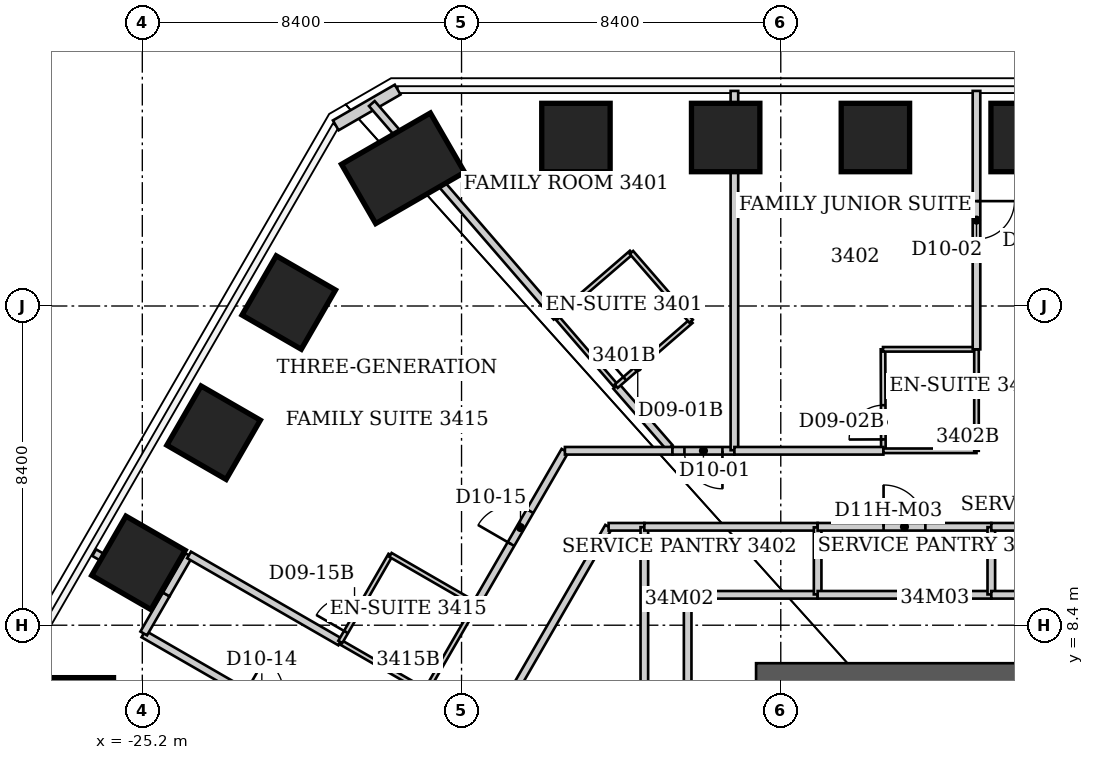
"""IFC4 building model, lengths in metres.
Left out: names, types, materials, properties, quantities, classifications, styles, units other than length and angle.
Written with IfcOpenShell. Run it as: python <this file> out.ifc"""

import sys

from ifc_helpers import new_model, si_unit, direction, frame, frame_2d, origin, origin_2d, place, context, subcontext, project, spatial, rectangle, extrude, element, fill, save


model = new_model("IFC4")
c1 = context("Model", 3, precision=1e-05, world=origin(), true_north=direction((0.0, 1.0)))
c2 = subcontext(c1, "Body", "Model", "MODEL_VIEW")
j1 = project(units=[si_unit("LENGTHUNIT", "METRE"), si_unit("PLANEANGLEUNIT", "RADIAN")], contexts=[c1])
p1 = place(None, origin())
s1 = spatial("IfcSite", under=j1, at=p1, CompositionType="ELEMENT")
p2 = place(p1, origin())
s2 = spatial("IfcBuilding", under=s1, at=p2, CompositionType="ELEMENT")
p3 = place(p2, frame((0.0, 0.0, 138.6)))
s3 = spatial("IfcBuildingStorey", under=s2, at=p3, CompositionType="ELEMENT", Elevation=138.6)
for number, where, z_axis, x_axis in (
    (1, (-13.79, 21.234, 0.0), (0.0, 0.0, 1.0), (0.0, 1.0, 0.0)),
    (2, (-9.85, 21.234, 0.0), (0.0, 0.0, 1.0), (0.0, 1.0, 0.0)),
    (3, (-5.91, 21.234, 0.0), (0.0, 0.0, 1.0), (0.0, 1.0, 0.0)),
    (4, (-1.97, 21.234, 0.0), (0.0, 0.0, 1.0), (0.0, 1.0, 0.0)),
):
    element("IfcColumn", number, at=place(p3, frame(where, z_axis=z_axis, x_axis=x_axis)), inside=s3, PredefinedType="COLUMN", context=c2, shape_type="SweptSolid", body=[
        extrude(rectangle(XDim=1.8, YDim=1.8, at=origin_2d()), origin(), (0.0, 0.0, 1.0), 3.8),
    ])
p4 = place(p3, frame((-26.857, 5.67, 0.0), z_axis=(0.0, 0.0, 1.0), x_axis=(-1.0, 0.0, 0.0)))
e5 = element("IfcColumn", 5, at=p4, inside=s3, PredefinedType="COLUMN", context=c2, shape_type="SweptSolid", body=[
    extrude(rectangle(XDim=1.8, YDim=2.7, at=origin_2d()), origin(), (0.0, 0.0, 1.0), 3.8),
])
for number, where, z_axis, x_axis in (
    (6, (-25.302, 10.041, 0.0), (0.0, 0.0, 1.0), (-0.866, 0.5, 0.0)),
    (7, (-23.324, 13.466, 0.0), (0.0, 0.0, 1.0), (-0.866, 0.5, 0.0)),
    (8, (-21.346, 16.891, 0.0), (0.0, 0.0, 1.0), (-0.866, 0.5, 0.0)),
):
    element("IfcColumn", number, at=place(p3, frame(where, z_axis=z_axis, x_axis=x_axis)), inside=s3, PredefinedType="COLUMN", context=c2, shape_type="SweptSolid", body=[
        extrude(rectangle(XDim=1.8, YDim=1.8, at=origin_2d()), origin(), (0.0, 0.0, 1.0), 3.8),
    ])
p5 = place(p3, frame((-18.339, 20.424, 0.0), z_axis=(0.0, 0.0, 1.0), x_axis=(-0.5, 0.866025403784, 0.0)))
e9 = element("IfcColumn", 9, at=p5, inside=s3, PredefinedType="COLUMN", context=c2, shape_type="SweptSolid", body=[
    extrude(rectangle(XDim=1.8, YDim=2.7, at=origin_2d()), origin(), (0.0, 0.0, 1.0), 3.8),
])
p6 = place(p3, frame((-9.05, 6.75, 0.0), z_axis=(0.0, 0.0, 1.0), x_axis=(1.0, 0.0, 0.0)))
e10 = element("IfcWall", 10, at=p6, inside=s3, PredefinedType="SHEAR", context=c2, shape_type="SweptSolid", body=[
    extrude(rectangle(XDim=18.1, YDim=1.3, at=frame_2d((9.05, 0.0))), origin(), (0.0, 0.0, 1.0), 3.8),
])
p7 = place(p3, frame((-20.11, 21.554, 0.0), z_axis=(0.0, 0.0, 1.0), x_axis=(0.865988793993, 0.500063404658, 0.0)))
e11 = element("IfcWall", 11, at=p7, inside=s3, PredefinedType="SOLIDWALL", context=c2, shape_type="SweptSolid", body=[
    extrude(rectangle(XDim=1.88, YDim=0.3, at=frame_2d((0.94, 0.0))), origin(), (0.0, 0.0, 1.0), 3.64),
])
p8 = place(p3, frame((-26.466, 10.31, 0.0), z_axis=(0.0, 0.0, 1.0), x_axis=(0.865037029405, -0.501708020425, 0.0)))
e12 = element("IfcWall", 12, at=p8, inside=s3, PredefinedType="PARTITIONING", context=c2, shape_type="SweptSolid", body=[
    extrude(rectangle(XDim=2.177, YDim=0.2, at=frame_2d((1.089, 0.0))), origin(), (0.0, 0.0, 1.0), 3.64),
])
p9 = place(p3, frame((-25.17, 8.17, 0.0), z_axis=(0.0, 0.0, 1.0), x_axis=(0.866448885678, -0.499265789443, 0.0)))
e13 = element("IfcWall", 13, at=p9, inside=s3, PredefinedType="PARTITIONING", context=c2, shape_type="SweptSolid", body=[
    extrude(rectangle(XDim=7.19, YDim=0.2, at=frame_2d((3.595, 0.0))), origin(), (0.0, 0.0, 1.0), 3.64),
])
p10 = place(p9, frame((3.095, 0.0, 0.0)))
e14 = element("IfcOpeningElement", 14, at=p10, cuts=e13, PredefinedType="OPENING", context=c2, shape_type="SweptSolid", body=[
    extrude(rectangle(XDim=1.0, YDim=2.13, at=frame_2d((0.5, 1.065))), frame((0.0, 0.1, 0.0), z_axis=(0.0, -1.0, 0.0), x_axis=(1.0, 0.0, 0.0)), (0.0, 0.0, 1.0), 0.2),
])
p11 = place(p3, frame((-25.163, 8.183, 0.0), z_axis=(0.0, 0.0, 1.0), x_axis=(0.499793761865, 0.866144442689, 0.0)))
e15 = element("IfcWall", 15, at=p11, inside=s3, PredefinedType="PARTITIONING", context=c2, shape_type="SweptSolid", body=[
    extrude(rectangle(XDim=1.186, YDim=0.2, at=frame_2d((0.593, 0.0))), origin(), (0.0, 0.0, 1.0), 3.64),
])
p12 = place(p3, frame((-24.57, 9.21, 0.0), z_axis=(0.0, 0.0, 1.0), x_axis=(0.499734288277, 0.866178758179, 0.0)))
e16 = element("IfcWall", 16, at=p12, inside=s3, PredefinedType="PARTITIONING", context=c2, shape_type="SweptSolid", body=[
    extrude(rectangle(XDim=1.191, YDim=0.2, at=frame_2d((0.595, 0.0))), origin(), (0.0, 0.0, 1.0), 3.64),
])
p13 = place(p3, frame((-23.97, 10.25, 0.0), z_axis=(0.0, 0.0, 1.0), x_axis=(0.86645101645, -0.499262091585, 0.0)))
e17 = element("IfcWall", 17, at=p13, inside=s3, PredefinedType="PARTITIONING", context=c2, shape_type="SweptSolid", body=[
    extrude(rectangle(XDim=4.592, YDim=0.2, at=frame_2d((2.296, 0.0))), origin(), (0.0, 0.0, 1.0), 3.64),
])
p14 = place(p3, frame((-19.991, 7.958, 0.0), z_axis=(0.0, 0.0, 1.0), x_axis=(0.866404475641, -0.499342852747, 0.0)))
e18 = element("IfcWall", 18, at=p14, inside=s3, PredefinedType="PARTITIONING", context=c2, shape_type="SweptSolid", body=[
    extrude(rectangle(XDim=2.599, YDim=0.12, at=frame_2d((1.299, 0.0))), origin(), (0.0, 0.0, 1.0), 3.64),
])
p15 = place(p3, frame((-19.16, 22.127, 0.0), z_axis=(0.0, 0.0, 1.0), x_axis=(0.654324699903, -0.756213717871, 0.0)))
e19 = element("IfcWall", 19, at=p15, inside=s3, PredefinedType="PARTITIONING", context=c2, shape_type="SweptSolid", body=[
    extrude(rectangle(XDim=7.428, YDim=0.2, at=frame_2d((3.714, 0.0))), origin(), (0.0, 0.0, 1.0), 3.64),
])
p16 = place(p3, frame((-18.67, 10.25, 0.0), z_axis=(0.0, 0.0, 1.0), x_axis=(-0.499407914056, -0.866366975004, 0.0)))
e20 = element("IfcWall", 20, at=p16, inside=s3, PredefinedType="PARTITIONING", context=c2, shape_type="SweptSolid", body=[
    extrude(rectangle(XDim=2.643, YDim=0.12, at=frame_2d((1.322, 0.0))), origin(), (0.0, 0.0, 1.0), 3.64),
])
p17 = place(p16, frame((1.443, 0.0, 0.0)))
e21 = element("IfcOpeningElement", 21, at=p17, cuts=e20, PredefinedType="OPENING", context=c2, shape_type="SweptSolid", body=[
    extrude(rectangle(XDim=0.9, YDim=2.03, at=frame_2d((0.45, 1.015))), frame((0.0, 0.06, 0.0), z_axis=(0.0, -1.0, 0.0), x_axis=(1.0, 0.0, 0.0)), (0.0, 0.0, 1.0), 0.12),
])
p18 = place(p3, frame((-17.74, 6.66, 0.0), z_axis=(0.0, 0.0, 1.0), x_axis=(0.500519174073, 0.865725450929, 0.0)))
e22 = element("IfcWall", 22, at=p18, inside=s3, PredefinedType="PARTITIONING", context=c2, shape_type="SweptSolid", body=[
    extrude(rectangle(XDim=2.643, YDim=0.12, at=frame_2d((1.322, 0.0))), origin(), (0.0, 0.0, 1.0), 3.64),
])
p19 = place(p3, frame((-16.56, 4.7, 0.0), z_axis=(0.0, 0.0, 1.0), x_axis=(0.4998524389, 0.866110581465, 0.0)))
e23 = element("IfcWall", 23, at=p19, inside=s3, PredefinedType="PARTITIONING", context=c2, shape_type="SweptSolid", body=[
    extrude(rectangle(XDim=7.262, YDim=0.2, at=frame_2d((3.631, 0.0))), origin(), (0.0, 0.0, 1.0), 3.64),
])
p20 = place(p3, frame((-16.42, 8.95, 0.0), z_axis=(0.0, 0.0, 1.0), x_axis=(-0.865856933682, 0.500291685314, 0.0)))
e24 = element("IfcWall", 24, at=p20, inside=s3, PredefinedType="PARTITIONING", context=c2, shape_type="SweptSolid", body=[
    extrude(rectangle(XDim=2.599, YDim=0.12, at=frame_2d((1.299, 0.0))), origin(), (0.0, 0.0, 1.0), 3.64),
])
p21 = place(p3, frame((-16.417, 8.948, 0.0), z_axis=(0.0, 0.0, 1.0), x_axis=(0.500547653499, 0.865708984923, 0.0)))
e25 = element("IfcWall", 25, at=p21, inside=s3, PredefinedType="PARTITIONING", context=c2, shape_type="SweptSolid", body=[
    extrude(rectangle(XDim=4.669, YDim=0.2, at=frame_2d((2.334, 0.0))), origin(), (0.0, 0.0, 1.0), 3.64),
])
p22 = place(p21, frame((1.834, 0.0, 0.0)))
e26 = element("IfcOpeningElement", 26, at=p22, cuts=e25, PredefinedType="OPENING", context=c2, shape_type="SweptSolid", body=[
    extrude(rectangle(XDim=1.0, YDim=2.13, at=frame_2d((0.5, 1.065))), frame((0.0, 0.1, 0.0), z_axis=(0.0, -1.0, 0.0), x_axis=(1.0, 0.0, 0.0)), (0.0, 0.0, 1.0), 0.2),
])
p23 = place(p3, frame((-14.3, 16.51, 0.0), z_axis=(0.0, 0.0, 1.0), x_axis=(0.653188728136, -0.757195143563, 0.0)))
e27 = element("IfcWall", 27, at=p23, inside=s3, PredefinedType="PARTITIONING", context=c2, shape_type="SweptSolid", body=[
    extrude(rectangle(XDim=2.404, YDim=0.12, at=frame_2d((1.202, 0.0))), origin(), (0.0, 0.0, 1.0), 3.64),
])
p24 = place(p3, frame((-12.93, 10.99, 0.0), z_axis=(0.0, 0.0, 1.0), x_axis=(1.0, 0.0, 0.0)))
e28 = element("IfcWall", 28, at=p24, inside=s3, PredefinedType="PARTITIONING", context=c2, shape_type="SweptSolid", body=[
    extrude(rectangle(XDim=0.94, YDim=0.2, at=frame_2d((0.47, 0.0))), origin(), (0.0, 0.0, 1.0), 3.64),
])
p25 = place(p3, frame((-12.73, 14.69, 0.0), z_axis=(0.0, 0.0, 1.0), x_axis=(0.656624063312, -0.754218031792, 0.0)))
e29 = element("IfcWall", 29, at=p25, inside=s3, PredefinedType="PARTITIONING", context=c2, shape_type="SweptSolid", body=[
    extrude(rectangle(XDim=2.144, YDim=0.2, at=frame_2d((1.072, 0.0))), origin(), (0.0, 0.0, 1.0), 3.64),
])
p26 = place(p3, frame((-12.73, 14.69, 0.0), z_axis=(0.0, 0.0, 1.0), x_axis=(0.755185511235, 0.655511131576, 0.0)))
e30 = element("IfcWall", 30, at=p26, inside=s3, PredefinedType="PARTITIONING", context=c2, shape_type="SweptSolid", body=[
    extrude(rectangle(XDim=2.609, YDim=0.12, at=frame_2d((1.304, 0.0))), origin(), (0.0, 0.0, 1.0), 3.64),
])
p27 = place(p26, frame((0.3, 0.0, 0.0)))
e31 = element("IfcOpeningElement", 31, at=p27, cuts=e30, PredefinedType="OPENING", context=c2, shape_type="SweptSolid", body=[
    extrude(rectangle(XDim=0.9, YDim=2.03, at=frame_2d((0.45, 1.015))), frame((0.0, 0.06, 0.0), z_axis=(0.0, -1.0, 0.0), x_axis=(1.0, 0.0, 0.0)), (0.0, 0.0, 1.0), 0.12),
])
p28 = place(p3, frame((-12.33, 18.21, 0.0), z_axis=(0.0, 0.0, 1.0), x_axis=(-0.757086659925, -0.653314464377, 0.0)))
e32 = element("IfcWall", 32, at=p28, inside=s3, PredefinedType="PARTITIONING", context=c2, shape_type="SweptSolid", body=[
    extrude(rectangle(XDim=2.602, YDim=0.12, at=frame_2d((1.301, 0.0))), origin(), (0.0, 0.0, 1.0), 3.64),
])
p29 = place(p3, frame((-11.99, 10.98, 0.0), z_axis=(0.0, 0.0, 1.0), x_axis=(0.0, -1.0, 0.0)))
e33 = element("IfcWall", 33, at=p29, inside=s3, PredefinedType="PARTITIONING", context=c2, shape_type="SweptSolid", body=[
    extrude(rectangle(XDim=13.98, YDim=0.2, at=frame_2d((6.99, 0.0))), origin(), (0.0, 0.0, 1.0), 3.64),
])
p30 = place(p3, frame((-11.99, 10.99, 0.0), z_axis=(0.0, 0.0, 1.0), x_axis=(1.0, 0.0, 0.0)))
e34 = element("IfcWall", 34, at=p30, inside=s3, PredefinedType="PARTITIONING", context=c2, shape_type="SweptSolid", body=[
    extrude(rectangle(XDim=4.56, YDim=0.2, at=frame_2d((2.28, 0.0))), origin(), (0.0, 0.0, 1.0), 3.64),
])
p31 = place(p3, frame((-11.25, 12.99, 0.0), z_axis=(0.0, 0.0, 1.0), x_axis=(-1.0, 0.0, 0.0)))
e35 = element("IfcWall", 35, at=p31, inside=s3, PredefinedType="PARTITIONING", context=c2, shape_type="SweptSolid", body=[
    extrude(rectangle(XDim=2.83, YDim=0.2, at=frame_2d((1.415, 0.0))), origin(), (0.0, 0.0, 1.0), 3.64),
])
p32 = place(p3, frame((-10.85, 9.2, 0.0), z_axis=(0.0, 0.0, 1.0), x_axis=(0.0, -1.0, 0.0)))
e36 = element("IfcWall", 36, at=p32, inside=s3, PredefinedType="PARTITIONING", context=c2, shape_type="SweptSolid", body=[
    extrude(rectangle(XDim=14.39, YDim=0.2, at=frame_2d((7.195, 0.0))), origin(), (0.0, 0.0, 1.0), 3.64),
])
p33 = place(p32, frame((6.645, 0.0, 0.0)))
e37 = element("IfcOpeningElement", 37, at=p33, cuts=e36, PredefinedType="OPENING", context=c2, shape_type="SweptSolid", body=[
    extrude(rectangle(XDim=1.1, YDim=2.2, at=frame_2d((0.55, 1.1))), frame((0.0, 0.1, 0.0), z_axis=(0.0, -1.0, 0.0), x_axis=(1.0, 0.0, 0.0)), (0.0, 0.0, 1.0), 0.2),
])
p34 = place(p3, frame((-10.76, 16.4, 0.0), z_axis=(0.0, 0.0, 1.0), x_axis=(-0.655252439976, 0.755409981338, 0.0)))
e38 = element("IfcWall", 38, at=p34, inside=s3, PredefinedType="PARTITIONING", context=c2, shape_type="SweptSolid", body=[
    extrude(rectangle(XDim=2.396, YDim=0.12, at=frame_2d((1.198, 0.0))), origin(), (0.0, 0.0, 1.0), 3.64),
])
p35 = place(p3, frame((-9.62, 12.99, 0.0), z_axis=(0.0, 0.0, 1.0), x_axis=(-1.0, 0.0, 0.0)))
e39 = element("IfcWall", 39, at=p35, inside=s3, PredefinedType="PARTITIONING", context=c2, shape_type="SweptSolid", body=[
    extrude(rectangle(XDim=1.63, YDim=0.2, at=frame_2d((0.815, 0.0))), origin(), (0.0, 0.0, 1.0), 3.64),
])
p36 = place(p35, frame((0.315, 0.0, 0.0)))
e40 = element("IfcOpeningElement", 40, at=p36, cuts=e39, PredefinedType="OPENING", context=c2, shape_type="SweptSolid", body=[
    extrude(rectangle(XDim=1.0, YDim=2.13, at=frame_2d((0.5, 1.065))), frame((0.0, 0.1, 0.0), z_axis=(0.0, -1.0, 0.0), x_axis=(1.0, 0.0, 0.0)), (0.0, 0.0, 1.0), 0.2),
])
p37 = place(p3, frame((-9.62, 22.46, 0.0), z_axis=(0.0, 0.0, 1.0), x_axis=(0.0, -1.0, 0.0)))
e41 = element("IfcWall", 41, at=p37, inside=s3, PredefinedType="PARTITIONING", context=c2, shape_type="SweptSolid", body=[
    extrude(rectangle(XDim=9.455, YDim=0.2, at=frame_2d((4.728, 0.0))), origin(), (0.0, 0.0, 1.0), 3.64),
])
p38 = place(p3, frame((-7.43, 9.2, 0.0), z_axis=(0.0, 0.0, 1.0), x_axis=(-1.0, 0.0, 0.0)))
e42 = element("IfcWall", 42, at=p38, inside=s3, PredefinedType="PARTITIONING", context=c2, shape_type="SweptSolid", body=[
    extrude(rectangle(XDim=3.41, YDim=0.2, at=frame_2d((1.705, 0.0))), origin(), (0.0, 0.0, 1.0), 3.64),
])
p39 = place(p3, frame((-7.43, 10.975, 0.0), z_axis=(0.0, 0.0, 1.0), x_axis=(0.0, -1.0, 0.0)))
e43 = element("IfcWall", 43, at=p39, inside=s3, PredefinedType="PARTITIONING", context=c2, shape_type="SweptSolid", body=[
    extrude(rectangle(XDim=1.765, YDim=0.2, at=frame_2d((0.883, 0.0))), origin(), (0.0, 0.0, 1.0), 3.64),
])
p40 = place(p3, frame((-7.43, 10.99, 0.0), z_axis=(0.0, 0.0, 1.0), x_axis=(1.0, 0.0, 0.0)))
e44 = element("IfcWall", 44, at=p40, inside=s3, PredefinedType="PARTITIONING", context=c2, shape_type="SweptSolid", body=[
    extrude(rectangle(XDim=4.57, YDim=0.2, at=frame_2d((2.285, 0.0))), origin(), (0.0, 0.0, 1.0), 3.64),
])
p41 = place(p40, frame((1.735, 0.0, 0.0)))
e45 = element("IfcOpeningElement", 45, at=p41, cuts=e44, PredefinedType="OPENING", context=c2, shape_type="SweptSolid", body=[
    extrude(rectangle(XDim=1.1, YDim=2.2, at=frame_2d((0.55, 1.1))), frame((0.0, 0.1, 0.0), z_axis=(0.0, -1.0, 0.0), x_axis=(1.0, 0.0, 0.0)), (0.0, 0.0, 1.0), 0.2),
])
p42 = place(p3, frame((-5.71, 15.66, 0.0), z_axis=(0.0, 0.0, 1.0), x_axis=(0.003749059241, -0.999992972253, 0.0)))
e46 = element("IfcWall", 46, at=p42, inside=s3, PredefinedType="PARTITIONING", context=c2, shape_type="SweptSolid", body=[
    extrude(rectangle(XDim=2.67, YDim=0.12, at=frame_2d((1.335, 0.0))), origin(), (0.0, 0.0, 1.0), 3.64),
])
p43 = place(p42, frame((1.47, 0.0, 0.0)))
e47 = element("IfcOpeningElement", 47, at=p43, cuts=e46, PredefinedType="OPENING", context=c2, shape_type="SweptSolid", body=[
    extrude(rectangle(XDim=0.9, YDim=2.03, at=frame_2d((0.45, 1.015))), frame((0.0, 0.06, 0.0), z_axis=(0.0, -1.0, 0.0), x_axis=(1.0, 0.0, 0.0)), (0.0, 0.0, 1.0), 0.12),
])
p44 = place(p3, frame((-5.7, 12.99, 0.0), z_axis=(0.0, 0.0, 1.0), x_axis=(-1.0, 0.0, 0.0)))
e48 = element("IfcWall", 48, at=p44, inside=s3, PredefinedType="PARTITIONING", context=c2, shape_type="SweptSolid", body=[
    extrude(rectangle(XDim=3.92, YDim=0.2, at=frame_2d((1.96, 0.0))), origin(), (0.0, 0.0, 1.0), 3.64),
])
p45 = place(p3, frame((-3.25, 12.99, 0.0), z_axis=(0.0, 0.0, 1.0), x_axis=(-1.0, 0.0, 0.0)))
e49 = element("IfcWall", 49, at=p45, inside=s3, PredefinedType="PARTITIONING", context=c2, shape_type="SweptSolid", body=[
    extrude(rectangle(XDim=2.45, YDim=0.12, at=frame_2d((1.225, 0.0))), origin(), (0.0, 0.0, 1.0), 3.64),
])
p46 = place(p3, frame((-3.25, 15.66, 0.0), z_axis=(0.0, 0.0, 1.0), x_axis=(-1.0, 0.0, 0.0)))
e50 = element("IfcWall", 50, at=p46, inside=s3, PredefinedType="PARTITIONING", context=c2, shape_type="SweptSolid", body=[
    extrude(rectangle(XDim=2.46, YDim=0.12, at=frame_2d((1.23, 0.0))), origin(), (0.0, 0.0, 1.0), 3.64),
])
p47 = place(p3, frame((-3.25, 15.66, 0.0), z_axis=(0.0, 0.0, 1.0), x_axis=(0.0, -1.0, 0.0)))
e51 = element("IfcWall", 51, at=p47, inside=s3, PredefinedType="PARTITIONING", context=c2, shape_type="SweptSolid", body=[
    extrude(rectangle(XDim=2.67, YDim=0.12, at=frame_2d((1.335, 0.0))), origin(), (0.0, 0.0, 1.0), 3.64),
])
p48 = place(p3, frame((-3.25, 22.46, 0.0), z_axis=(0.0, 0.0, 1.0), x_axis=(0.0, -1.0, 0.0)))
e52 = element("IfcWall", 52, at=p48, inside=s3, PredefinedType="PARTITIONING", context=c2, shape_type="SweptSolid", body=[
    extrude(rectangle(XDim=6.8, YDim=0.2, at=frame_2d((3.4, 0.0))), origin(), (0.0, 0.0, 1.0), 3.64),
])
p49 = place(p48, frame((2.9, 0.0, 0.0)))
e53 = element("IfcOpeningElement", 53, at=p49, cuts=e52, PredefinedType="OPENING", context=c2, shape_type="SweptSolid", body=[
    extrude(rectangle(XDim=1.0, YDim=2.13, at=frame_2d((0.5, 1.065))), frame((0.0, 0.1, 0.0), z_axis=(0.0, -1.0, 0.0), x_axis=(1.0, 0.0, 0.0)), (0.0, 0.0, 1.0), 0.2),
])
p50 = place(p3, frame((-2.86, 9.2, 0.0), z_axis=(0.0, 0.0, 1.0), x_axis=(-1.0, 0.0, 0.0)))
e54 = element("IfcWall", 54, at=p50, inside=s3, PredefinedType="PARTITIONING", context=c2, shape_type="SweptSolid", body=[
    extrude(rectangle(XDim=4.57, YDim=0.2, at=frame_2d((2.285, 0.0))), origin(), (0.0, 0.0, 1.0), 3.64),
])
p51 = place(p3, frame((-2.86, 10.98, 0.0), z_axis=(0.0, 0.0, 1.0), x_axis=(0.0, -1.0, 0.0)))
e55 = element("IfcWall", 55, at=p51, inside=s3, PredefinedType="PARTITIONING", context=c2, shape_type="SweptSolid", body=[
    extrude(rectangle(XDim=1.77, YDim=0.2, at=frame_2d((0.885, 0.0))), origin(), (0.0, 0.0, 1.0), 3.64),
])
p52 = place(p3, frame((-2.86, 10.99, 0.0), z_axis=(0.0, 0.0, 1.0), x_axis=(1.0, 0.0, 0.0)))
e56 = element("IfcWall", 56, at=p52, inside=s3, PredefinedType="PARTITIONING", context=c2, shape_type="SweptSolid", body=[
    extrude(rectangle(XDim=4.57, YDim=0.2, at=frame_2d((2.285, 0.0))), origin(), (0.0, 0.0, 1.0), 3.64),
])
p53 = place(p52, frame((1.735, 0.0, 0.0)))
e57 = element("IfcOpeningElement", 57, at=p53, cuts=e56, PredefinedType="OPENING", context=c2, shape_type="SweptSolid", body=[
    extrude(rectangle(XDim=1.1, YDim=2.2, at=frame_2d((0.55, 1.1))), frame((0.0, 0.1, 0.0), z_axis=(0.0, -1.0, 0.0), x_axis=(1.0, 0.0, 0.0)), (0.0, 0.0, 1.0), 0.2),
])
p54 = place(p3, frame((1.71, 9.2, 0.0), z_axis=(0.0, 0.0, 1.0), x_axis=(-1.0, 0.0, 0.0)))
e58 = element("IfcWall", 58, at=p54, inside=s3, PredefinedType="PARTITIONING", context=c2, shape_type="SweptSolid", body=[
    extrude(rectangle(XDim=4.57, YDim=0.2, at=frame_2d((2.285, 0.0))), origin(), (0.0, 0.0, 1.0), 3.64),
])
p55 = place(p36, origin())
e59 = element("IfcDoor", 59, at=p55, inside=s3, OperationType="SINGLE_SWING_LEFT", PredefinedType="DOOR", context=c2, shape_type="SweptSolid", body=[
    extrude(rectangle(XDim=1.0, YDim=2.13, at=frame_2d((0.5, 1.065))), frame((0.0, 0.025, 0.0), z_axis=(0.0, -1.0, 0.0), x_axis=(1.0, 0.0, 0.0)), (0.0, 0.0, 1.0), 0.05),
])
fill(e40, e59)
p56 = place(p27, origin())
e60 = element("IfcDoor", 60, at=p56, inside=s3, OperationType="SINGLE_SWING_LEFT", PredefinedType="DOOR", context=c2, shape_type="SweptSolid", body=[
    extrude(rectangle(XDim=0.9, YDim=2.03, at=frame_2d((0.45, 1.015))), frame((0.0, 0.025, 0.0), z_axis=(0.0, -1.0, 0.0), x_axis=(1.0, 0.0, 0.0)), (0.0, 0.0, 1.0), 0.05),
])
fill(e31, e60)
p57 = place(p49, origin())
e61 = element("IfcDoor", 61, at=p57, inside=s3, OperationType="SINGLE_SWING_LEFT", PredefinedType="DOOR", context=c2, shape_type="SweptSolid", body=[
    extrude(rectangle(XDim=1.0, YDim=2.13, at=frame_2d((0.5, 1.065))), frame((0.0, 0.025, 0.0), z_axis=(0.0, -1.0, 0.0), x_axis=(1.0, 0.0, 0.0)), (0.0, 0.0, 1.0), 0.05),
])
fill(e53, e61)
p58 = place(p43, origin())
e62 = element("IfcDoor", 62, at=p58, inside=s3, OperationType="SINGLE_SWING_RIGHT", PredefinedType="DOOR", context=c2, shape_type="SweptSolid", body=[
    extrude(rectangle(XDim=0.9, YDim=2.03, at=frame_2d((0.45, 1.015))), frame((0.0, 0.025, 0.0), z_axis=(0.0, -1.0, 0.0), x_axis=(1.0, 0.0, 0.0)), (0.0, 0.0, 1.0), 0.05),
])
fill(e47, e62)
p59 = place(p22, origin())
e63 = element("IfcDoor", 63, at=p59, inside=s3, OperationType="SINGLE_SWING_LEFT", PredefinedType="DOOR", context=c2, shape_type="SweptSolid", body=[
    extrude(rectangle(XDim=1.0, YDim=2.13, at=frame_2d((0.5, 1.065))), frame((0.0, 0.025, 0.0), z_axis=(0.0, -1.0, 0.0), x_axis=(1.0, 0.0, 0.0)), (0.0, 0.0, 1.0), 0.05),
])
fill(e26, e63)
p60 = place(p17, origin())
e64 = element("IfcDoor", 64, at=p60, inside=s3, OperationType="SINGLE_SWING_RIGHT", PredefinedType="DOOR", context=c2, shape_type="SweptSolid", body=[
    extrude(rectangle(XDim=0.9, YDim=2.03, at=frame_2d((0.45, 1.015))), frame((0.0, 0.025, 0.0), z_axis=(0.0, -1.0, 0.0), x_axis=(1.0, 0.0, 0.0)), (0.0, 0.0, 1.0), 0.05),
])
fill(e21, e64)
p61 = place(p41, origin())
e65 = element("IfcDoor", 65, at=p61, inside=s3, OperationType="SINGLE_SWING_LEFT", PredefinedType="DOOR", context=c2, shape_type="SweptSolid", body=[
    extrude(rectangle(XDim=1.1, YDim=2.2, at=frame_2d((0.55, 1.1))), frame((0.0, 0.025, 0.0), z_axis=(0.0, -1.0, 0.0), x_axis=(1.0, 0.0, 0.0)), (0.0, 0.0, 1.0), 0.05),
])
fill(e45, e65)
save(model, sys.argv[1])
